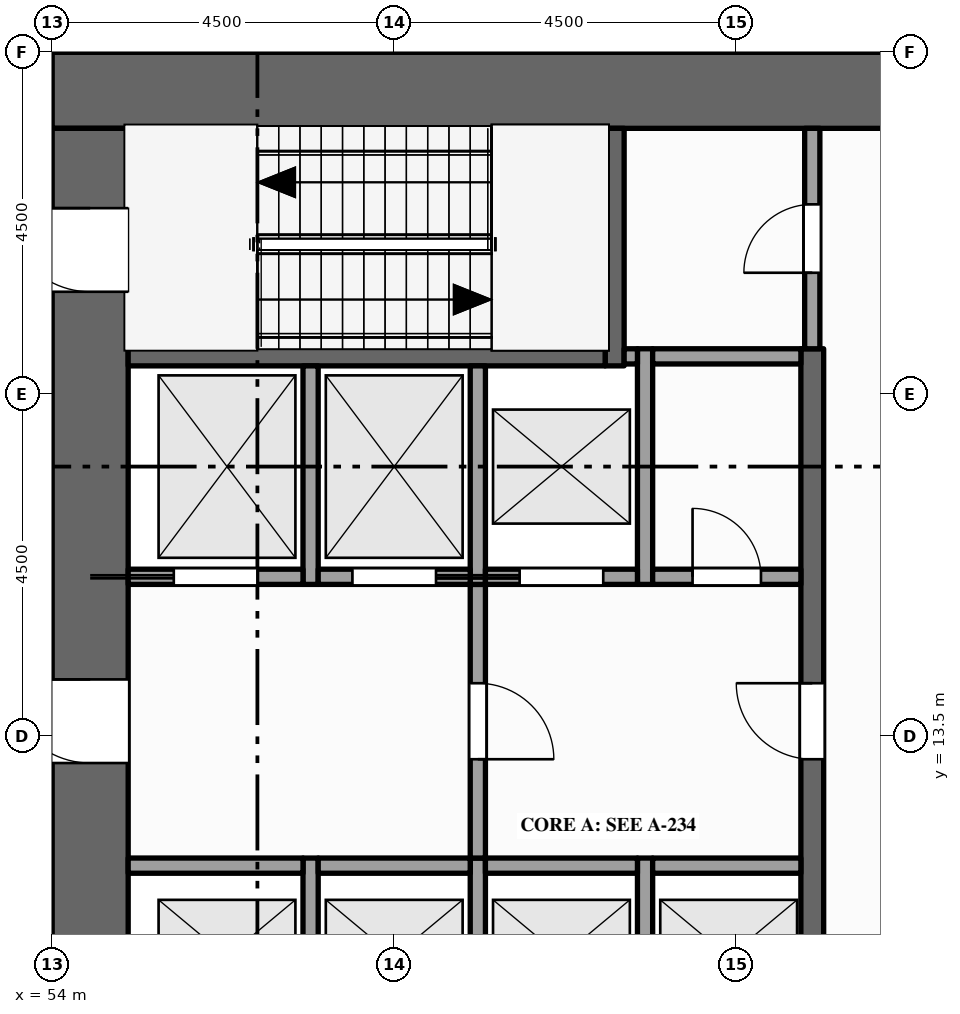
"""IFC4 building model, lengths in metres.
Left out: names, types, materials, properties, quantities, classifications, styles, units other than length and angle.
Written with IfcOpenShell. Run it as: python <this file> out.ifc"""

import sys

from ifc_helpers import new_model, si_unit, direction, frame, frame_2d, origin, place, context, subcontext, project, spatial, rectangle, extrude, element, fill, save


model = new_model("IFC4")
c1 = context("Model", 3, precision=1e-05, world=origin(), true_north=direction((0.0, 1.0)))
c2 = subcontext(c1, "Body", "Model", "MODEL_VIEW")
j1 = project(units=[si_unit("LENGTHUNIT", "METRE"), si_unit("PLANEANGLEUNIT", "RADIAN")], contexts=[c1])
p1 = place(None, origin())
s1 = spatial("IfcSite", under=j1, at=p1, CompositionType="ELEMENT")
p2 = place(p1, origin())
s2 = spatial("IfcBuilding", under=s1, at=p2, CompositionType="ELEMENT")
p3 = place(p2, frame((0.0, 0.0, 187.0)))
s3 = spatial("IfcBuildingStorey", under=s2, at=p3, CompositionType="ELEMENT", Elevation=187.0)
p4 = place(p3, frame((54.0, 22.0, -0.15), z_axis=(0.0, 0.0, 1.0), x_axis=(1.0, 0.0, 0.0)))
e1 = element("IfcWall", 1, at=p4, inside=s3, PredefinedType="SHEAR", context=c2, shape_type="SweptSolid", body=[
    extrude(rectangle(XDim=13.5, YDim=1.0, at=frame_2d((6.75, 0.0))), origin(), (0.0, 0.0, 1.0), 8.0),
])
p5 = place(p3, frame((54.5, 1.0, -0.15), z_axis=(0.0, 0.0, 1.0), x_axis=(0.0, 1.0, 0.0)))
e2 = element("IfcWall", 2, at=p5, inside=s3, PredefinedType="SHEAR", context=c2, shape_type="SweptSolid", body=[
    extrude(rectangle(XDim=20.5, YDim=1.0, at=frame_2d((10.25, 0.0))), origin(), (0.0, 0.0, 1.0), 8.0),
])
p6 = place(p5, frame((6.1, 0.0, 0.15)))
e3 = element("IfcOpeningElement", 3, at=p6, cuts=e2, PredefinedType="OPENING", context=c2, shape_type="SweptSolid", body=[
    extrude(rectangle(XDim=1.8, YDim=2.1, at=frame_2d((0.9, 1.05))), frame((0.0, 0.51, 0.0), z_axis=(0.0, -1.0, 0.0), x_axis=(1.0, 0.0, 0.0)), (0.0, 0.0, 1.0), 1.02),
])
p7 = place(p5, frame((12.15, 0.0, 0.15)))
e4 = element("IfcOpeningElement", 4, at=p7, cuts=e2, PredefinedType="OPENING", context=c2, shape_type="SweptSolid", body=[
    extrude(rectangle(XDim=1.1, YDim=2.1, at=frame_2d((0.55, 1.05))), frame((0.0, 0.51, 0.0), z_axis=(0.0, -1.0, 0.0), x_axis=(1.0, 0.0, 0.0)), (0.0, 0.0, 1.0), 1.02),
])
p8 = place(p5, frame((1.15, 0.0, 0.15)))
e5 = element("IfcOpeningElement", 5, at=p8, cuts=e2, PredefinedType="OPENING", context=c2, shape_type="SweptSolid", body=[
    extrude(rectangle(XDim=1.1, YDim=2.1, at=frame_2d((0.55, 1.05))), frame((0.0, 0.51, 0.0), z_axis=(0.0, -1.0, 0.0), x_axis=(1.0, 0.0, 0.0)), (0.0, 0.0, 1.0), 1.02),
])
p9 = place(p5, frame((18.35, 0.0, 0.15)))
e6 = element("IfcOpeningElement", 6, at=p9, cuts=e2, PredefinedType="OPENING", context=c2, shape_type="SweptSolid", body=[
    extrude(rectangle(XDim=1.1, YDim=2.1, at=frame_2d((0.55, 1.05))), frame((0.0, 0.51, 0.0), z_axis=(0.0, -1.0, 0.0), x_axis=(1.0, 0.0, 0.0)), (0.0, 0.0, 1.0), 1.02),
])
p10 = place(p3, frame((57.4, 9.3, 0.0), z_axis=(0.0, 0.0, 1.0), x_axis=(0.0, 1.0, 0.0)))
e7 = element("IfcWall", 7, at=p10, inside=s3, PredefinedType="SOLIDWALL", context=c2, shape_type="SweptSolid", body=[
    extrude(rectangle(XDim=2.6, YDim=0.2, at=frame_2d((1.3, 0.0))), origin(), (0.0, 0.0, 1.0), 7.85),
])
p11 = place(p3, frame((57.4, 15.5, 0.0), z_axis=(0.0, 0.0, 1.0), x_axis=(0.0, 1.0, 0.0)))
e8 = element("IfcWall", 8, at=p11, inside=s3, PredefinedType="SOLIDWALL", context=c2, shape_type="SweptSolid", body=[
    extrude(rectangle(XDim=2.875, YDim=0.2, at=frame_2d((1.438, 0.0))), origin(), (0.0, 0.0, 1.0), 7.85),
])
p12 = place(p3, frame((59.6, 9.3, 0.0), z_axis=(0.0, 0.0, 1.0), x_axis=(0.0, 1.0, 0.0)))
e9 = element("IfcWall", 9, at=p12, inside=s3, PredefinedType="SOLIDWALL", context=c2, shape_type="SweptSolid", body=[
    extrude(rectangle(XDim=2.6, YDim=0.2, at=frame_2d((1.3, 0.0))), origin(), (0.0, 0.0, 1.0), 7.85),
])
p13 = place(p3, frame((59.6, 11.9, 0.0), z_axis=(0.0, 0.0, 1.0), x_axis=(0.0, 1.0, 0.0)))
e10 = element("IfcWall", 10, at=p13, inside=s3, PredefinedType="PARTITIONING", context=c2, shape_type="SweptSolid", body=[
    extrude(rectangle(XDim=3.6, YDim=0.2, at=frame_2d((1.8, 0.0))), origin(), (0.0, 0.0, 1.0), 7.85),
])
p14 = place(p13, frame((1.3, 0.0, 0.0)))
e11 = element("IfcOpeningElement", 11, at=p14, cuts=e10, PredefinedType="OPENING", context=c2, shape_type="SweptSolid", body=[
    extrude(rectangle(XDim=1.0, YDim=2.1, at=frame_2d((0.5, 1.05))), frame((0.0, 0.11, 0.0), z_axis=(0.0, -1.0, 0.0), x_axis=(1.0, 0.0, 0.0)), (0.0, 0.0, 1.0), 0.22),
])
p15 = place(p3, frame((59.6, 15.5, 0.0), z_axis=(0.0, 0.0, 1.0), x_axis=(0.0, 1.0, 0.0)))
e12 = element("IfcWall", 12, at=p15, inside=s3, PredefinedType="SOLIDWALL", context=c2, shape_type="SweptSolid", body=[
    extrude(rectangle(XDim=2.875, YDim=0.2, at=frame_2d((1.438, 0.0))), origin(), (0.0, 0.0, 1.0), 7.85),
])
p16 = place(p3, frame((61.4, 18.375, 0.0), z_axis=(0.0, 0.0, 1.0), x_axis=(0.0, 1.0, 0.0)))
e13 = element("IfcWall", 13, at=p16, inside=s3, PredefinedType="SHEAR", context=c2, shape_type="SweptSolid", body=[
    extrude(rectangle(XDim=3.125, YDim=0.25, at=frame_2d((1.562, 0.0))), origin(), (0.0, 0.0, 1.0), 7.85),
])
p17 = place(p3, frame((61.8, 9.3, 0.0), z_axis=(0.0, 0.0, 1.0), x_axis=(0.0, 1.0, 0.0)))
e14 = element("IfcWall", 14, at=p17, inside=s3, PredefinedType="SOLIDWALL", context=c2, shape_type="SweptSolid", body=[
    extrude(rectangle(XDim=2.6, YDim=0.2, at=frame_2d((1.3, 0.0))), origin(), (0.0, 0.0, 1.0), 7.85),
])
p18 = place(p3, frame((61.8, 15.5, 0.0), z_axis=(0.0, 0.0, 1.0), x_axis=(0.0, 1.0, 0.0)))
e15 = element("IfcWall", 15, at=p18, inside=s3, PredefinedType="SOLIDWALL", context=c2, shape_type="SweptSolid", body=[
    extrude(rectangle(XDim=3.1, YDim=0.2, at=frame_2d((1.55, 0.0))), origin(), (0.0, 0.0, 1.0), 7.85),
])
p19 = place(p3, frame((64.0, 4.1, 0.0), z_axis=(0.0, 0.0, 1.0), x_axis=(0.0, 1.0, 0.0)))
e16 = element("IfcWall", 16, at=p19, inside=s3, PredefinedType="SHEAR", context=c2, shape_type="SweptSolid", body=[
    extrude(rectangle(XDim=14.5, YDim=0.3, at=frame_2d((7.25, 0.0))), origin(), (0.0, 0.0, 1.0), 7.85),
])
p20 = place(p19, frame((3.4, 0.0, 0.0)))
e17 = element("IfcOpeningElement", 17, at=p20, cuts=e16, PredefinedType="OPENING", context=c2, shape_type="SweptSolid", body=[
    extrude(rectangle(XDim=1.0, YDim=2.1, at=frame_2d((0.5, 1.05))), frame((0.0, 0.16, 0.0), z_axis=(0.0, -1.0, 0.0), x_axis=(1.0, 0.0, 0.0)), (0.0, 0.0, 1.0), 0.32),
])
p21 = place(p19, frame((9.1, 0.0, 0.0)))
e18 = element("IfcOpeningElement", 18, at=p21, cuts=e16, PredefinedType="OPENING", context=c2, shape_type="SweptSolid", body=[
    extrude(rectangle(XDim=1.0, YDim=2.1, at=frame_2d((0.5, 1.05))), frame((0.0, 0.16, 0.0), z_axis=(0.0, -1.0, 0.0), x_axis=(1.0, 0.0, 0.0)), (0.0, 0.0, 1.0), 0.32),
])
p22 = place(p3, frame((64.0, 18.6, 0.0), z_axis=(0.0, 0.0, 1.0), x_axis=(0.0, 1.0, 0.0)))
e19 = element("IfcWall", 19, at=p22, inside=s3, PredefinedType="PARTITIONING", context=c2, shape_type="SweptSolid", body=[
    extrude(rectangle(XDim=2.9, YDim=0.2, at=frame_2d((1.45, 0.0))), origin(), (0.0, 0.0, 1.0), 7.85),
])
p23 = place(p22, frame((1.0, 0.0, 0.0)))
e20 = element("IfcOpeningElement", 20, at=p23, cuts=e19, PredefinedType="OPENING", context=c2, shape_type="SweptSolid", body=[
    extrude(rectangle(XDim=0.9, YDim=2.1, at=frame_2d((0.45, 1.05))), frame((0.0, 0.11, 0.0), z_axis=(0.0, -1.0, 0.0), x_axis=(1.0, 0.0, 0.0)), (0.0, 0.0, 1.0), 0.22),
])
p24 = place(p3, frame((55.0, 11.8, 0.0), z_axis=(0.0, 0.0, 1.0), x_axis=(1.0, 0.0, 0.0)))
e21 = element("IfcWall", 21, at=p24, inside=s3, PredefinedType="SOLIDWALL", context=c2, shape_type="SweptSolid", body=[
    extrude(rectangle(XDim=2.3, YDim=0.2, at=frame_2d((1.15, 0.0))), origin(), (0.0, 0.0, 1.0), 7.85),
])
for number, where, z_axis, x_axis in (
    (22, (57.5, 11.8, 0.0), (0.0, 0.0, 1.0), (1.0, 0.0, 0.0)),
    (23, (59.7, 11.8, 0.0), (0.0, 0.0, 1.0), (1.0, 0.0, 0.0)),
):
    element("IfcWall", number, at=place(p3, frame(where, z_axis=z_axis, x_axis=x_axis)), inside=s3, PredefinedType="SOLIDWALL", context=c2, shape_type="SweptSolid", body=[
        extrude(rectangle(XDim=2.0, YDim=0.2, at=frame_2d((1.0, 0.0))), origin(), (0.0, 0.0, 1.0), 7.85),
    ])
p25 = place(p3, frame((61.9, 11.8, 0.0), z_axis=(0.0, 0.0, 1.0), x_axis=(1.0, 0.0, 0.0)))
e24 = element("IfcWall", 24, at=p25, inside=s3, PredefinedType="SOLIDWALL", context=c2, shape_type="SweptSolid", body=[
    extrude(rectangle(XDim=1.95, YDim=0.2, at=frame_2d((0.975, 0.0))), origin(), (0.0, 0.0, 1.0), 7.85),
])
p26 = place(p3, frame((55.0, 15.6, 0.0), z_axis=(0.0, 0.0, 1.0), x_axis=(1.0, 0.0, 0.0)))
e25 = element("IfcWall", 25, at=p26, inside=s3, PredefinedType="SOLIDWALL", context=c2, shape_type="SweptSolid", body=[
    extrude(rectangle(XDim=2.3, YDim=0.2, at=frame_2d((1.15, 0.0))), origin(), (0.0, 0.0, 1.0), 7.85),
])
p27 = place(p26, frame((0.6, 0.0, 0.012)))
e26 = element("IfcOpeningElement", 26, at=p27, cuts=e25, PredefinedType="OPENING", context=c2, shape_type="SweptSolid", body=[
    extrude(rectangle(XDim=1.1, YDim=2.1, at=frame_2d((0.55, 1.05))), frame((0.0, 0.11, 0.0), z_axis=(0.0, -1.0, 0.0), x_axis=(1.0, 0.0, 0.0)), (0.0, 0.0, 1.0), 0.22),
])
p28 = place(p3, frame((57.5, 15.6, 0.0), z_axis=(0.0, 0.0, 1.0), x_axis=(1.0, 0.0, 0.0)))
e27 = element("IfcWall", 27, at=p28, inside=s3, PredefinedType="SOLIDWALL", context=c2, shape_type="SweptSolid", body=[
    extrude(rectangle(XDim=2.0, YDim=0.2, at=frame_2d((1.0, 0.0))), origin(), (0.0, 0.0, 1.0), 7.85),
])
p29 = place(p28, frame((0.45, 0.0, 0.012)))
e28 = element("IfcOpeningElement", 28, at=p29, cuts=e27, PredefinedType="OPENING", context=c2, shape_type="SweptSolid", body=[
    extrude(rectangle(XDim=1.1, YDim=2.1, at=frame_2d((0.55, 1.05))), frame((0.0, 0.11, 0.0), z_axis=(0.0, -1.0, 0.0), x_axis=(1.0, 0.0, 0.0)), (0.0, 0.0, 1.0), 0.22),
])
p30 = place(p3, frame((59.7, 15.6, 0.0), z_axis=(0.0, 0.0, 1.0), x_axis=(1.0, 0.0, 0.0)))
e29 = element("IfcWall", 29, at=p30, inside=s3, PredefinedType="SOLIDWALL", context=c2, shape_type="SweptSolid", body=[
    extrude(rectangle(XDim=2.0, YDim=0.2, at=frame_2d((1.0, 0.0))), origin(), (0.0, 0.0, 1.0), 7.85),
])
p31 = place(p30, frame((0.45, 0.0, 0.012)))
e30 = element("IfcOpeningElement", 30, at=p31, cuts=e29, PredefinedType="OPENING", context=c2, shape_type="SweptSolid", body=[
    extrude(rectangle(XDim=1.1, YDim=2.1, at=frame_2d((0.55, 1.05))), frame((0.0, 0.11, 0.0), z_axis=(0.0, -1.0, 0.0), x_axis=(1.0, 0.0, 0.0)), (0.0, 0.0, 1.0), 0.22),
])
p32 = place(p3, frame((61.9, 15.6, 0.0), z_axis=(0.0, 0.0, 1.0), x_axis=(1.0, 0.0, 0.0)))
e31 = element("IfcWall", 31, at=p32, inside=s3, PredefinedType="PARTITIONING", context=c2, shape_type="SweptSolid", body=[
    extrude(rectangle(XDim=1.95, YDim=0.2, at=frame_2d((0.975, 0.0))), origin(), (0.0, 0.0, 1.0), 7.85),
])
p33 = place(p32, frame((0.525, 0.0, 0.0)))
e32 = element("IfcOpeningElement", 32, at=p33, cuts=e31, PredefinedType="OPENING", context=c2, shape_type="SweptSolid", body=[
    extrude(rectangle(XDim=0.9, YDim=2.1, at=frame_2d((0.45, 1.05))), frame((0.0, 0.11, 0.0), z_axis=(0.0, -1.0, 0.0), x_axis=(1.0, 0.0, 0.0)), (0.0, 0.0, 1.0), 0.22),
])
p34 = place(p3, frame((55.0, 18.5, 0.0), z_axis=(0.0, 0.0, 1.0), x_axis=(1.0, 0.0, 0.0)))
e33 = element("IfcWall", 33, at=p34, inside=s3, PredefinedType="SHEAR", context=c2, shape_type="SweptSolid", body=[
    extrude(rectangle(XDim=6.275, YDim=0.25, at=frame_2d((3.137, 0.0))), origin(), (0.0, 0.0, 1.0), 7.85),
])
p35 = place(p3, frame((61.525, 18.5, 0.0), z_axis=(0.0, 0.0, 1.0), x_axis=(1.0, 0.0, 0.0)))
e34 = element("IfcWall", 34, at=p35, inside=s3, PredefinedType="SOLIDWALL", context=c2, shape_type="SweptSolid", body=[
    extrude(rectangle(XDim=0.175, YDim=0.2, at=frame_2d((0.087, 0.0))), origin(), (0.0, 0.0, 1.0), 7.85),
])
p36 = place(p3, frame((61.9, 18.5, 0.0), z_axis=(0.0, 0.0, 1.0), x_axis=(1.0, 0.0, 0.0)))
e35 = element("IfcWall", 35, at=p36, inside=s3, PredefinedType="PARTITIONING", context=c2, shape_type="SweptSolid", body=[
    extrude(rectangle(XDim=1.95, YDim=0.2, at=frame_2d((0.975, 0.0))), origin(), (0.0, 0.0, 1.0), 7.85),
])
p37 = place(p27, origin())
e36 = element("IfcDoor", 36, at=p37, inside=s3, OperationType="SLIDING_TO_LEFT", PredefinedType="DOOR", context=c2, shape_type="SweptSolid", body=[
    extrude(rectangle(XDim=1.1, YDim=2.1, at=frame_2d((0.55, 1.05))), frame((0.0, 0.025, 0.0), z_axis=(0.0, -1.0, 0.0), x_axis=(1.0, 0.0, 0.0)), (0.0, 0.0, 1.0), 0.05),
])
fill(e26, e36)
p38 = place(p29, origin())
e37 = element("IfcDoor", 37, at=p38, inside=s3, OperationType="SLIDING_TO_RIGHT", PredefinedType="DOOR", context=c2, shape_type="SweptSolid", body=[
    extrude(rectangle(XDim=1.1, YDim=2.1, at=frame_2d((0.55, 1.05))), frame((0.0, 0.025, 0.0), z_axis=(0.0, -1.0, 0.0), x_axis=(1.0, 0.0, 0.0)), (0.0, 0.0, 1.0), 0.05),
])
fill(e28, e37)
p39 = place(p31, origin())
e38 = element("IfcDoor", 38, at=p39, inside=s3, OperationType="SLIDING_TO_LEFT", PredefinedType="DOOR", context=c2, shape_type="SweptSolid", body=[
    extrude(rectangle(XDim=1.1, YDim=2.1, at=frame_2d((0.55, 1.05))), frame((0.0, 0.025, 0.0), z_axis=(0.0, -1.0, 0.0), x_axis=(1.0, 0.0, 0.0)), (0.0, 0.0, 1.0), 0.05),
])
fill(e30, e38)
p40 = place(p7, origin())
e39 = element("IfcDoor", 39, at=p40, inside=s3, OperationType="SINGLE_SWING_RIGHT", PredefinedType="DOOR", context=c2, shape_type="SweptSolid", body=[
    extrude(rectangle(XDim=1.1, YDim=2.1, at=frame_2d((0.55, 1.05))), frame((0.0, 0.025, 0.0), z_axis=(0.0, -1.0, 0.0), x_axis=(1.0, 0.0, 0.0)), (0.0, 0.0, 1.0), 0.05),
])
fill(e4, e39)
p41 = place(p14, origin())
e40 = element("IfcDoor", 40, at=p41, inside=s3, OperationType="SINGLE_SWING_LEFT", PredefinedType="DOOR", context=c2, shape_type="SweptSolid", body=[
    extrude(rectangle(XDim=1.0, YDim=2.1, at=frame_2d((0.5, 1.05))), frame((0.0, 0.025, 0.0), z_axis=(0.0, -1.0, 0.0), x_axis=(1.0, 0.0, 0.0)), (0.0, 0.0, 1.0), 0.05),
])
fill(e11, e40)
p42 = place(p21, origin())
e41 = element("IfcDoor", 41, at=p42, inside=s3, OperationType="SINGLE_SWING_RIGHT", PredefinedType="DOOR", context=c2, shape_type="SweptSolid", body=[
    extrude(rectangle(XDim=1.0, YDim=2.1, at=frame_2d((0.5, 1.05))), frame((0.0, 0.025, 0.0), z_axis=(0.0, -1.0, 0.0), x_axis=(1.0, 0.0, 0.0)), (0.0, 0.0, 1.0), 0.05),
])
fill(e18, e41)
p43 = place(p9, origin())
e42 = element("IfcDoor", 42, at=p43, inside=s3, OperationType="SINGLE_SWING_RIGHT", PredefinedType="DOOR", context=c2, shape_type="SweptSolid", body=[
    extrude(rectangle(XDim=1.1, YDim=2.1, at=frame_2d((0.55, 1.05))), frame((0.0, 0.025, 0.0), z_axis=(0.0, -1.0, 0.0), x_axis=(1.0, 0.0, 0.0)), (0.0, 0.0, 1.0), 0.05),
])
fill(e6, e42)
p44 = place(p23, origin())
e43 = element("IfcDoor", 43, at=p44, inside=s3, OperationType="SINGLE_SWING_LEFT", PredefinedType="DOOR", context=c2, shape_type="SweptSolid", body=[
    extrude(rectangle(XDim=0.9, YDim=2.1, at=frame_2d((0.45, 1.05))), frame((0.0, 0.025, 0.0), z_axis=(0.0, -1.0, 0.0), x_axis=(1.0, 0.0, 0.0)), (0.0, 0.0, 1.0), 0.05),
])
fill(e20, e43)
p45 = place(p33, origin())
e44 = element("IfcDoor", 44, at=p45, inside=s3, OperationType="SINGLE_SWING_LEFT", PredefinedType="DOOR", context=c2, shape_type="SweptSolid", body=[
    extrude(rectangle(XDim=0.9, YDim=2.1, at=frame_2d((0.45, 1.05))), frame((0.0, 0.025, 0.0), z_axis=(0.0, -1.0, 0.0), x_axis=(1.0, 0.0, 0.0)), (0.0, 0.0, 1.0), 0.05),
])
fill(e32, e44)
save(model, sys.argv[1])
